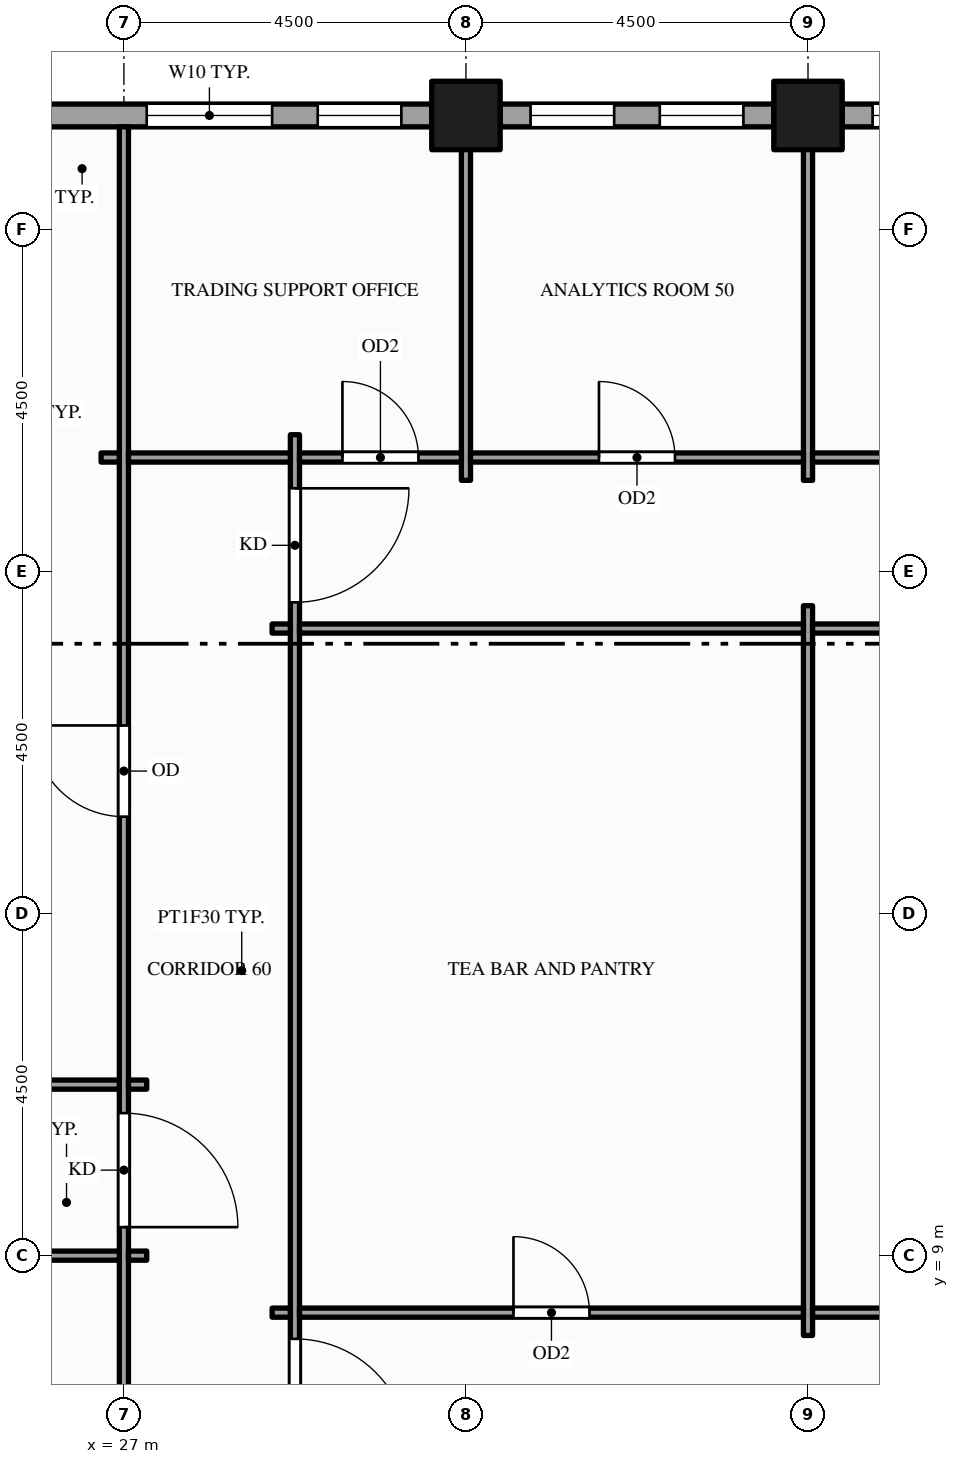
"""IFC4 building model, lengths in metres.
Left out: names, types, materials, properties, quantities, classifications, styles, units other than length and angle.
Written with IfcOpenShell. Run it as: python <this file> out.ifc"""

import sys

from ifc_helpers import new_model, si_unit, direction, frame, frame_2d, origin, origin_2d, place, context, subcontext, project, spatial, rectangle, hollow_rectangle, extrude, element, fill, save


model = new_model("IFC4")
c1 = context("Model", 3, precision=1e-05, world=origin(), true_north=direction((0.0, 1.0)))
c2 = subcontext(c1, "Body", "Model", "MODEL_VIEW")
j1 = project(units=[si_unit("LENGTHUNIT", "METRE"), si_unit("PLANEANGLEUNIT", "RADIAN")], contexts=[c1])
p1 = place(None, origin())
s1 = spatial("IfcSite", under=j1, at=p1, CompositionType="ELEMENT")
p2 = place(p1, origin())
s2 = spatial("IfcBuilding", under=s1, at=p2, CompositionType="ELEMENT")
p3 = place(p2, frame((0.0, 0.0, 183.0)))
s3 = spatial("IfcBuildingStorey", under=s2, at=p3, CompositionType="ELEMENT", Elevation=183.0)
for number, where, z_axis, x_axis in (
    (1, (31.5, 24.0, -0.15), (0.0, 0.0, 1.0), (1.0, 0.0, 0.0)),
    (2, (36.0, 24.0, -0.15), (0.0, 0.0, 1.0), (1.0, 0.0, 0.0)),
):
    element("IfcColumn", number, at=place(p3, frame(where, z_axis=z_axis, x_axis=x_axis)), inside=s3, PredefinedType="COLUMN", context=c2, shape_type="SweptSolid", body=[
        extrude(hollow_rectangle(XDim=0.9, YDim=0.9, WallThickness=0.045, at=origin_2d()), origin(), (0.0, 0.0, 1.0), 3.9),
    ])
p4 = place(p3, frame((40.05, 24.0, 0.0), z_axis=(0.0, 0.0, 1.0), x_axis=(-1.0, 0.0, 0.0)))
e3 = element("IfcWall", 3, at=p4, inside=s3, PredefinedType="STANDARD", context=c2, shape_type="SweptSolid", body=[
    extrude(rectangle(XDim=3.6, YDim=0.3, at=frame_2d((1.8, 0.0))), origin(), (0.0, 0.0, 1.0), 3.049),
])
p5 = place(p4, frame((0.4, 0.0, 0.9)))
e4 = element("IfcOpeningElement", 4, at=p5, cuts=e3, PredefinedType="OPENING", context=c2, shape_type="SweptSolid", body=[
    extrude(rectangle(XDim=1.1, YDim=2.0, at=frame_2d((0.55, 1.0))), frame((0.0, 0.16, 0.0), z_axis=(0.0, -1.0, 0.0), x_axis=(1.0, 0.0, 0.0)), (0.0, 0.0, 1.0), 0.32),
])
p6 = place(p4, frame((2.1, 0.0, 0.9)))
e5 = element("IfcOpeningElement", 5, at=p6, cuts=e3, PredefinedType="OPENING", context=c2, shape_type="SweptSolid", body=[
    extrude(rectangle(XDim=1.1, YDim=2.0, at=frame_2d((0.55, 1.0))), frame((0.0, 0.16, 0.0), z_axis=(0.0, -1.0, 0.0), x_axis=(1.0, 0.0, 0.0)), (0.0, 0.0, 1.0), 0.32),
])
p7 = place(p3, frame((35.55, 24.0, 0.0), z_axis=(0.0, 0.0, 1.0), x_axis=(-1.0, 0.0, 0.0)))
e6 = element("IfcWall", 6, at=p7, inside=s3, PredefinedType="STANDARD", context=c2, shape_type="SweptSolid", body=[
    extrude(rectangle(XDim=3.6, YDim=0.3, at=frame_2d((1.8, 0.0))), origin(), (0.0, 0.0, 1.0), 3.049),
])
p8 = place(p7, frame((0.4, 0.0, 0.9)))
e7 = element("IfcOpeningElement", 7, at=p8, cuts=e6, PredefinedType="OPENING", context=c2, shape_type="SweptSolid", body=[
    extrude(rectangle(XDim=1.1, YDim=2.0, at=frame_2d((0.55, 1.0))), frame((0.0, 0.16, 0.0), z_axis=(0.0, -1.0, 0.0), x_axis=(1.0, 0.0, 0.0)), (0.0, 0.0, 1.0), 0.32),
])
p9 = place(p7, frame((2.1, 0.0, 0.9)))
e8 = element("IfcOpeningElement", 8, at=p9, cuts=e6, PredefinedType="OPENING", context=c2, shape_type="SweptSolid", body=[
    extrude(rectangle(XDim=1.1, YDim=2.0, at=frame_2d((0.55, 1.0))), frame((0.0, 0.16, 0.0), z_axis=(0.0, -1.0, 0.0), x_axis=(1.0, 0.0, 0.0)), (0.0, 0.0, 1.0), 0.32),
])
p10 = place(p3, frame((31.05, 24.0, 0.0), z_axis=(0.0, 0.0, 1.0), x_axis=(-1.0, 0.0, 0.0)))
e9 = element("IfcWall", 9, at=p10, inside=s3, PredefinedType="STANDARD", context=c2, shape_type="SweptSolid", body=[
    extrude(rectangle(XDim=5.1, YDim=0.3, at=frame_2d((2.55, 0.0))), origin(), (0.0, 0.0, 1.0), 3.049),
])
p11 = place(p10, frame((0.4, 0.0, 0.9)))
e10 = element("IfcOpeningElement", 10, at=p11, cuts=e9, PredefinedType="OPENING", context=c2, shape_type="SweptSolid", body=[
    extrude(rectangle(XDim=1.1, YDim=2.0, at=frame_2d((0.55, 1.0))), frame((0.0, 0.16, 0.0), z_axis=(0.0, -1.0, 0.0), x_axis=(1.0, 0.0, 0.0)), (0.0, 0.0, 1.0), 0.32),
])
p12 = place(p10, frame((2.1, 0.0, 0.9)))
e11 = element("IfcOpeningElement", 11, at=p12, cuts=e9, PredefinedType="OPENING", context=c2, shape_type="SweptSolid", body=[
    extrude(rectangle(XDim=1.65, YDim=2.0, at=frame_2d((0.825, 1.0))), frame((0.0, 0.16, 0.0), z_axis=(0.0, -1.0, 0.0), x_axis=(1.0, 0.0, 0.0)), (0.0, 0.0, 1.0), 0.32),
])
p13 = place(p3, frame((27.0, 1.65, 0.0), z_axis=(0.0, 0.0, 1.0), x_axis=(0.0, 1.0, 0.0)))
e12 = element("IfcWall", 12, at=p13, inside=s3, PredefinedType="PARTITIONING", context=c2, shape_type="SweptSolid", body=[
    extrude(rectangle(XDim=22.2, YDim=0.12, at=frame_2d((11.1, 0.0))), origin(), (0.0, 0.0, 1.0), 2.35),
])
p14 = place(p13, frame((7.725, 0.0, 0.0)))
e13 = element("IfcOpeningElement", 13, at=p14, cuts=e12, PredefinedType="OPENING", context=c2, shape_type="SweptSolid", body=[
    extrude(rectangle(XDim=1.5, YDim=2.1, at=frame_2d((0.75, 1.05))), frame((0.0, 0.07, 0.0), z_axis=(0.0, -1.0, 0.0), x_axis=(1.0, 0.0, 0.0)), (0.0, 0.0, 1.0), 0.14),
])
p15 = place(p13, frame((13.125, 0.0, 0.0)))
e14 = element("IfcOpeningElement", 14, at=p15, cuts=e12, PredefinedType="OPENING", context=c2, shape_type="SweptSolid", body=[
    extrude(rectangle(XDim=1.2, YDim=2.1, at=frame_2d((0.6, 1.05))), frame((0.0, 0.07, 0.0), z_axis=(0.0, -1.0, 0.0), x_axis=(1.0, 0.0, 0.0)), (0.0, 0.0, 1.0), 0.14),
])
p16 = place(p3, frame((29.25, 5.7, 0.0), z_axis=(0.0, 0.0, 1.0), x_axis=(0.0, 1.0, 0.0)))
e15 = element("IfcWall", 15, at=p16, inside=s3, PredefinedType="PARTITIONING", context=c2, shape_type="SweptSolid", body=[
    extrude(rectangle(XDim=14.1, YDim=0.12, at=frame_2d((7.05, 0.0))), origin(), (0.0, 0.0, 1.0), 2.77),
])
p17 = place(p16, frame((0.705, 0.0, 0.0)))
e16 = element("IfcOpeningElement", 16, at=p17, cuts=e15, PredefinedType="OPENING", context=c2, shape_type="SweptSolid", body=[
    extrude(rectangle(XDim=1.5, YDim=2.1, at=frame_2d((0.75, 1.05))), frame((0.0, 0.07, 0.0), z_axis=(0.0, -1.0, 0.0), x_axis=(1.0, 0.0, 0.0)), (0.0, 0.0, 1.0), 0.14),
])
p18 = place(p16, frame((11.895, 0.0, 0.0)))
e17 = element("IfcOpeningElement", 17, at=p18, cuts=e15, PredefinedType="OPENING", context=c2, shape_type="SweptSolid", body=[
    extrude(rectangle(XDim=1.5, YDim=2.1, at=frame_2d((0.75, 1.05))), frame((0.0, 0.07, 0.0), z_axis=(0.0, -1.0, 0.0), x_axis=(1.0, 0.0, 0.0)), (0.0, 0.0, 1.0), 0.14),
])
p19 = place(p3, frame((31.5, 19.2, 0.0), z_axis=(0.0, 0.0, 1.0), x_axis=(0.0, 1.0, 0.0)))
e18 = element("IfcWall", 18, at=p19, inside=s3, PredefinedType="PARTITIONING", context=c2, shape_type="SweptSolid", body=[
    extrude(rectangle(XDim=4.65, YDim=0.12, at=frame_2d((2.325, 0.0))), origin(), (0.0, 0.0, 1.0), 2.35),
])
p20 = place(p3, frame((36.0, 7.95, 0.0), z_axis=(0.0, 0.0, 1.0), x_axis=(0.0, 1.0, 0.0)))
e19 = element("IfcWall", 19, at=p20, inside=s3, PredefinedType="PARTITIONING", context=c2, shape_type="SweptSolid", body=[
    extrude(rectangle(XDim=9.6, YDim=0.12, at=frame_2d((4.8, 0.0))), origin(), (0.0, 0.0, 1.0), 2.77),
])
p21 = place(p3, frame((36.0, 19.2, 0.0), z_axis=(0.0, 0.0, 1.0), x_axis=(0.0, 1.0, 0.0)))
e20 = element("IfcWall", 20, at=p21, inside=s3, PredefinedType="PARTITIONING", context=c2, shape_type="SweptSolid", body=[
    extrude(rectangle(XDim=4.65, YDim=0.12, at=frame_2d((2.325, 0.0))), origin(), (0.0, 0.0, 1.0), 2.35),
])
p22 = place(p3, frame((28.95, 8.25, 0.0), z_axis=(0.0, 0.0, 1.0), x_axis=(1.0, 0.0, 0.0)))
e21 = element("IfcWall", 21, at=p22, inside=s3, PredefinedType="PARTITIONING", context=c2, shape_type="SweptSolid", body=[
    extrude(rectangle(XDim=0.24, YDim=0.12, at=frame_2d((0.12, 0.0))), origin(), (0.0, 0.0, 1.0), 2.77),
])
p23 = place(p3, frame((29.31, 8.25, 0.0), z_axis=(0.0, 0.0, 1.0), x_axis=(1.0, 0.0, 0.0)))
e22 = element("IfcWall", 22, at=p23, inside=s3, PredefinedType="PARTITIONING", context=c2, shape_type="SweptSolid", body=[
    extrude(rectangle(XDim=6.63, YDim=0.12, at=frame_2d((3.315, 0.0))), origin(), (0.0, 0.0, 1.0), 2.77),
])
p24 = place(p23, frame((2.815, 0.0, 0.0)))
e23 = element("IfcOpeningElement", 23, at=p24, cuts=e22, PredefinedType="OPENING", context=c2, shape_type="SweptSolid", body=[
    extrude(rectangle(XDim=1.0, YDim=2.1, at=frame_2d((0.5, 1.05))), frame((0.0, 0.07, 0.0), z_axis=(0.0, -1.0, 0.0), x_axis=(1.0, 0.0, 0.0)), (0.0, 0.0, 1.0), 0.14),
])
p25 = place(p3, frame((36.06, 8.25, 0.0), z_axis=(0.0, 0.0, 1.0), x_axis=(1.0, 0.0, 0.0)))
e24 = element("IfcWall", 24, at=p25, inside=s3, PredefinedType="PARTITIONING", context=c2, shape_type="SweptSolid", body=[
    extrude(rectangle(XDim=4.38, YDim=0.12, at=frame_2d((2.19, 0.0))), origin(), (0.0, 0.0, 1.0), 2.77),
])
p26 = place(p3, frame((22.56, 9.0, 0.0), z_axis=(0.0, 0.0, 1.0), x_axis=(1.0, 0.0, 0.0)))
e25 = element("IfcWall", 25, at=p26, inside=s3, PredefinedType="PARTITIONING", context=c2, shape_type="SweptSolid", body=[
    extrude(rectangle(XDim=4.38, YDim=0.12, at=frame_2d((2.19, 0.0))), origin(), (0.0, 0.0, 1.0), 2.77),
])
p27 = place(p26, frame((1.74, 0.0, 0.0)))
e26 = element("IfcOpeningElement", 26, at=p27, cuts=e25, PredefinedType="OPENING", context=c2, shape_type="SweptSolid", body=[
    extrude(rectangle(XDim=0.9, YDim=2.1, at=frame_2d((0.45, 1.05))), frame((0.0, 0.07, 0.0), z_axis=(0.0, -1.0, 0.0), x_axis=(1.0, 0.0, 0.0)), (0.0, 0.0, 1.0), 0.14),
])
p28 = place(p3, frame((27.06, 9.0, 0.0), z_axis=(0.0, 0.0, 1.0), x_axis=(1.0, 0.0, 0.0)))
e27 = element("IfcWall", 27, at=p28, inside=s3, PredefinedType="PARTITIONING", context=c2, shape_type="SweptSolid", body=[
    extrude(rectangle(XDim=0.24, YDim=0.12, at=frame_2d((0.12, 0.0))), origin(), (0.0, 0.0, 1.0), 2.77),
])
p29 = place(p3, frame((13.56, 11.25, 0.0), z_axis=(0.0, 0.0, 1.0), x_axis=(1.0, 0.0, 0.0)))
e28 = element("IfcWall", 28, at=p29, inside=s3, PredefinedType="PARTITIONING", context=c2, shape_type="SweptSolid", body=[
    extrude(rectangle(XDim=13.38, YDim=0.12, at=frame_2d((6.69, 0.0))), origin(), (0.0, 0.0, 1.0), 2.77),
])
p30 = place(p29, frame((3.54, 0.0, 0.0)))
e29 = element("IfcOpeningElement", 29, at=p30, cuts=e28, PredefinedType="OPENING", context=c2, shape_type="SweptSolid", body=[
    extrude(rectangle(XDim=1.8, YDim=2.1, at=frame_2d((0.9, 1.05))), frame((0.0, 0.07, 0.0), z_axis=(0.0, -1.0, 0.0), x_axis=(1.0, 0.0, 0.0)), (0.0, 0.0, 1.0), 0.14),
])
for number, where, z_axis, x_axis in (
    (30, (27.06, 11.25, 0.0), (0.0, 0.0, 1.0), (1.0, 0.0, 0.0)),
    (31, (28.95, 17.25, 0.0), (0.0, 0.0, 1.0), (1.0, 0.0, 0.0)),
):
    element("IfcWall", number, at=place(p3, frame(where, z_axis=z_axis, x_axis=x_axis)), inside=s3, PredefinedType="PARTITIONING", context=c2, shape_type="SweptSolid", body=[
        extrude(rectangle(XDim=0.24, YDim=0.12, at=frame_2d((0.12, 0.0))), origin(), (0.0, 0.0, 1.0), 2.77),
    ])
p31 = place(p3, frame((29.31, 17.25, 0.0), z_axis=(0.0, 0.0, 1.0), x_axis=(1.0, 0.0, 0.0)))
e32 = element("IfcWall", 32, at=p31, inside=s3, PredefinedType="PARTITIONING", context=c2, shape_type="SweptSolid", body=[
    extrude(rectangle(XDim=6.63, YDim=0.12, at=frame_2d((3.315, 0.0))), origin(), (0.0, 0.0, 1.0), 2.77),
])
p32 = place(p3, frame((36.06, 17.25, 0.0), z_axis=(0.0, 0.0, 1.0), x_axis=(1.0, 0.0, 0.0)))
e33 = element("IfcWall", 33, at=p32, inside=s3, PredefinedType="PARTITIONING", context=c2, shape_type="SweptSolid", body=[
    extrude(rectangle(XDim=4.38, YDim=0.12, at=frame_2d((2.19, 0.0))), origin(), (0.0, 0.0, 1.0), 2.77),
])
p33 = place(p32, frame((1.69, 0.0, 0.0)))
e34 = element("IfcOpeningElement", 34, at=p33, cuts=e33, PredefinedType="OPENING", context=c2, shape_type="SweptSolid", body=[
    extrude(rectangle(XDim=1.0, YDim=2.1, at=frame_2d((0.5, 1.05))), frame((0.0, 0.07, 0.0), z_axis=(0.0, -1.0, 0.0), x_axis=(1.0, 0.0, 0.0)), (0.0, 0.0, 1.0), 0.14),
])
p34 = place(p3, frame((26.7, 19.5, 0.0), z_axis=(0.0, 0.0, 1.0), x_axis=(1.0, 0.0, 0.0)))
e35 = element("IfcWall", 35, at=p34, inside=s3, PredefinedType="PARTITIONING", context=c2, shape_type="SweptSolid", body=[
    extrude(rectangle(XDim=0.24, YDim=0.12, at=frame_2d((0.12, 0.0))), origin(), (0.0, 0.0, 1.0), 2.77),
])
p35 = place(p3, frame((27.06, 19.5, 0.0), z_axis=(0.0, 0.0, 1.0), x_axis=(1.0, 0.0, 0.0)))
e36 = element("IfcWall", 36, at=p35, inside=s3, PredefinedType="PARTITIONING", context=c2, shape_type="SweptSolid", body=[
    extrude(rectangle(XDim=2.13, YDim=0.12, at=frame_2d((1.065, 0.0))), origin(), (0.0, 0.0, 1.0), 2.77),
])
p36 = place(p3, frame((29.31, 19.5, 0.0), z_axis=(0.0, 0.0, 1.0), x_axis=(1.0, 0.0, 0.0)))
e37 = element("IfcWall", 37, at=p36, inside=s3, PredefinedType="PARTITIONING", context=c2, shape_type="SweptSolid", body=[
    extrude(rectangle(XDim=2.13, YDim=0.12, at=frame_2d((1.065, 0.0))), origin(), (0.0, 0.0, 1.0), 2.77),
])
p37 = place(p36, frame((0.565, 0.0, 0.0)))
e38 = element("IfcOpeningElement", 38, at=p37, cuts=e37, PredefinedType="OPENING", context=c2, shape_type="SweptSolid", body=[
    extrude(rectangle(XDim=1.0, YDim=2.1, at=frame_2d((0.5, 1.05))), frame((0.0, 0.07, 0.0), z_axis=(0.0, -1.0, 0.0), x_axis=(1.0, 0.0, 0.0)), (0.0, 0.0, 1.0), 0.14),
])
p38 = place(p3, frame((31.56, 19.5, 0.0), z_axis=(0.0, 0.0, 1.0), x_axis=(1.0, 0.0, 0.0)))
e39 = element("IfcWall", 39, at=p38, inside=s3, PredefinedType="PARTITIONING", context=c2, shape_type="SweptSolid", body=[
    extrude(rectangle(XDim=4.38, YDim=0.12, at=frame_2d((2.19, 0.0))), origin(), (0.0, 0.0, 1.0), 2.77),
])
p39 = place(p38, frame((1.69, 0.0, 0.0)))
e40 = element("IfcOpeningElement", 40, at=p39, cuts=e39, PredefinedType="OPENING", context=c2, shape_type="SweptSolid", body=[
    extrude(rectangle(XDim=1.0, YDim=2.1, at=frame_2d((0.5, 1.05))), frame((0.0, 0.07, 0.0), z_axis=(0.0, -1.0, 0.0), x_axis=(1.0, 0.0, 0.0)), (0.0, 0.0, 1.0), 0.14),
])
p40 = place(p3, frame((36.06, 19.5, 0.0), z_axis=(0.0, 0.0, 1.0), x_axis=(1.0, 0.0, 0.0)))
e41 = element("IfcWall", 41, at=p40, inside=s3, PredefinedType="PARTITIONING", context=c2, shape_type="SweptSolid", body=[
    extrude(rectangle(XDim=4.38, YDim=0.12, at=frame_2d((2.19, 0.0))), origin(), (0.0, 0.0, 1.0), 2.77),
])
p41 = place(p40, frame((1.69, 0.0, 0.0)))
e42 = element("IfcOpeningElement", 42, at=p41, cuts=e41, PredefinedType="OPENING", context=c2, shape_type="SweptSolid", body=[
    extrude(rectangle(XDim=1.0, YDim=2.1, at=frame_2d((0.5, 1.05))), frame((0.0, 0.07, 0.0), z_axis=(0.0, -1.0, 0.0), x_axis=(1.0, 0.0, 0.0)), (0.0, 0.0, 1.0), 0.14),
])
p42 = place(p6, origin())
e43 = element("IfcWindow", 43, at=p42, inside=s3, PartitioningType="SINGLE_PANEL", PredefinedType="WINDOW", context=c2, shape_type="SweptSolid", body=[
    extrude(rectangle(XDim=1.1, YDim=2.0, at=frame_2d((0.55, 1.0))), frame((0.0, 0.03, 0.0), z_axis=(0.0, -1.0, 0.0), x_axis=(1.0, 0.0, 0.0)), (0.0, 0.0, 1.0), 0.06),
])
fill(e5, e43)
p43 = place(p8, origin())
e44 = element("IfcWindow", 44, at=p43, inside=s3, PartitioningType="SINGLE_PANEL", PredefinedType="WINDOW", context=c2, shape_type="SweptSolid", body=[
    extrude(rectangle(XDim=1.1, YDim=2.0, at=frame_2d((0.55, 1.0))), frame((0.0, 0.03, 0.0), z_axis=(0.0, -1.0, 0.0), x_axis=(1.0, 0.0, 0.0)), (0.0, 0.0, 1.0), 0.06),
])
fill(e7, e44)
p44 = place(p9, origin())
e45 = element("IfcWindow", 45, at=p44, inside=s3, PartitioningType="SINGLE_PANEL", PredefinedType="WINDOW", context=c2, shape_type="SweptSolid", body=[
    extrude(rectangle(XDim=1.1, YDim=2.0, at=frame_2d((0.55, 1.0))), frame((0.0, 0.03, 0.0), z_axis=(0.0, -1.0, 0.0), x_axis=(1.0, 0.0, 0.0)), (0.0, 0.0, 1.0), 0.06),
])
fill(e8, e45)
p45 = place(p11, origin())
e46 = element("IfcWindow", 46, at=p45, inside=s3, PartitioningType="SINGLE_PANEL", PredefinedType="WINDOW", context=c2, shape_type="SweptSolid", body=[
    extrude(rectangle(XDim=1.1, YDim=2.0, at=frame_2d((0.55, 1.0))), frame((0.0, 0.03, 0.0), z_axis=(0.0, -1.0, 0.0), x_axis=(1.0, 0.0, 0.0)), (0.0, 0.0, 1.0), 0.06),
])
fill(e10, e46)
p46 = place(p12, origin())
e47 = element("IfcWindow", 47, at=p46, inside=s3, PartitioningType="SINGLE_PANEL", PredefinedType="WINDOW", context=c2, shape_type="SweptSolid", body=[
    extrude(rectangle(XDim=1.65, YDim=2.0, at=frame_2d((0.825, 1.0))), frame((0.0, 0.03, 0.0), z_axis=(0.0, -1.0, 0.0), x_axis=(1.0, 0.0, 0.0)), (0.0, 0.0, 1.0), 0.06),
])
fill(e11, e47)
p47 = place(p14, origin())
e48 = element("IfcDoor", 48, at=p47, inside=s3, OperationType="SINGLE_SWING_LEFT", PredefinedType="DOOR", context=c2, shape_type="SweptSolid", body=[
    extrude(rectangle(XDim=1.5, YDim=2.1, at=frame_2d((0.75, 1.05))), frame((0.0, 0.025, 0.0), z_axis=(0.0, -1.0, 0.0), x_axis=(1.0, 0.0, 0.0)), (0.0, 0.0, 1.0), 0.05),
])
fill(e13, e48)
p48 = place(p17, origin())
e49 = element("IfcDoor", 49, at=p48, inside=s3, OperationType="SINGLE_SWING_LEFT", PredefinedType="DOOR", context=c2, shape_type="SweptSolid", body=[
    extrude(rectangle(XDim=1.5, YDim=2.1, at=frame_2d((0.75, 1.05))), frame((0.0, 0.025, 0.0), z_axis=(0.0, -1.0, 0.0), x_axis=(1.0, 0.0, 0.0)), (0.0, 0.0, 1.0), 0.05),
])
fill(e16, e49)
p49 = place(p18, origin())
e50 = element("IfcDoor", 50, at=p49, inside=s3, OperationType="SINGLE_SWING_RIGHT", PredefinedType="DOOR", context=c2, shape_type="SweptSolid", body=[
    extrude(rectangle(XDim=1.5, YDim=2.1, at=frame_2d((0.75, 1.05))), frame((0.0, 0.025, 0.0), z_axis=(0.0, -1.0, 0.0), x_axis=(1.0, 0.0, 0.0)), (0.0, 0.0, 1.0), 0.05),
])
fill(e17, e50)
p50 = place(p24, origin())
e51 = element("IfcDoor", 51, at=p50, inside=s3, OperationType="SINGLE_SWING_LEFT", PredefinedType="DOOR", context=c2, shape_type="SweptSolid", body=[
    extrude(rectangle(XDim=1.0, YDim=2.1, at=frame_2d((0.5, 1.05))), frame((0.0, 0.025, 0.0), z_axis=(0.0, -1.0, 0.0), x_axis=(1.0, 0.0, 0.0)), (0.0, 0.0, 1.0), 0.05),
])
fill(e23, e51)
p51 = place(p37, origin())
e52 = element("IfcDoor", 52, at=p51, inside=s3, OperationType="SINGLE_SWING_LEFT", PredefinedType="DOOR", context=c2, shape_type="SweptSolid", body=[
    extrude(rectangle(XDim=1.0, YDim=2.1, at=frame_2d((0.5, 1.05))), frame((0.0, 0.025, 0.0), z_axis=(0.0, -1.0, 0.0), x_axis=(1.0, 0.0, 0.0)), (0.0, 0.0, 1.0), 0.05),
])
fill(e38, e52)
p52 = place(p39, origin())
e53 = element("IfcDoor", 53, at=p52, inside=s3, OperationType="SINGLE_SWING_LEFT", PredefinedType="DOOR", context=c2, shape_type="SweptSolid", body=[
    extrude(rectangle(XDim=1.0, YDim=2.1, at=frame_2d((0.5, 1.05))), frame((0.0, 0.025, 0.0), z_axis=(0.0, -1.0, 0.0), x_axis=(1.0, 0.0, 0.0)), (0.0, 0.0, 1.0), 0.05),
])
fill(e40, e53)
p53 = place(p15, origin())
e54 = element("IfcDoor", 54, at=p53, inside=s3, OperationType="SINGLE_SWING_RIGHT", PredefinedType="DOOR", context=c2, shape_type="SweptSolid", body=[
    extrude(rectangle(XDim=1.2, YDim=2.1, at=frame_2d((0.6, 1.05))), frame((0.0, 0.025, 0.0), z_axis=(0.0, -1.0, 0.0), x_axis=(1.0, 0.0, 0.0)), (0.0, 0.0, 1.0), 0.05),
])
fill(e14, e54)
save(model, sys.argv[1])
